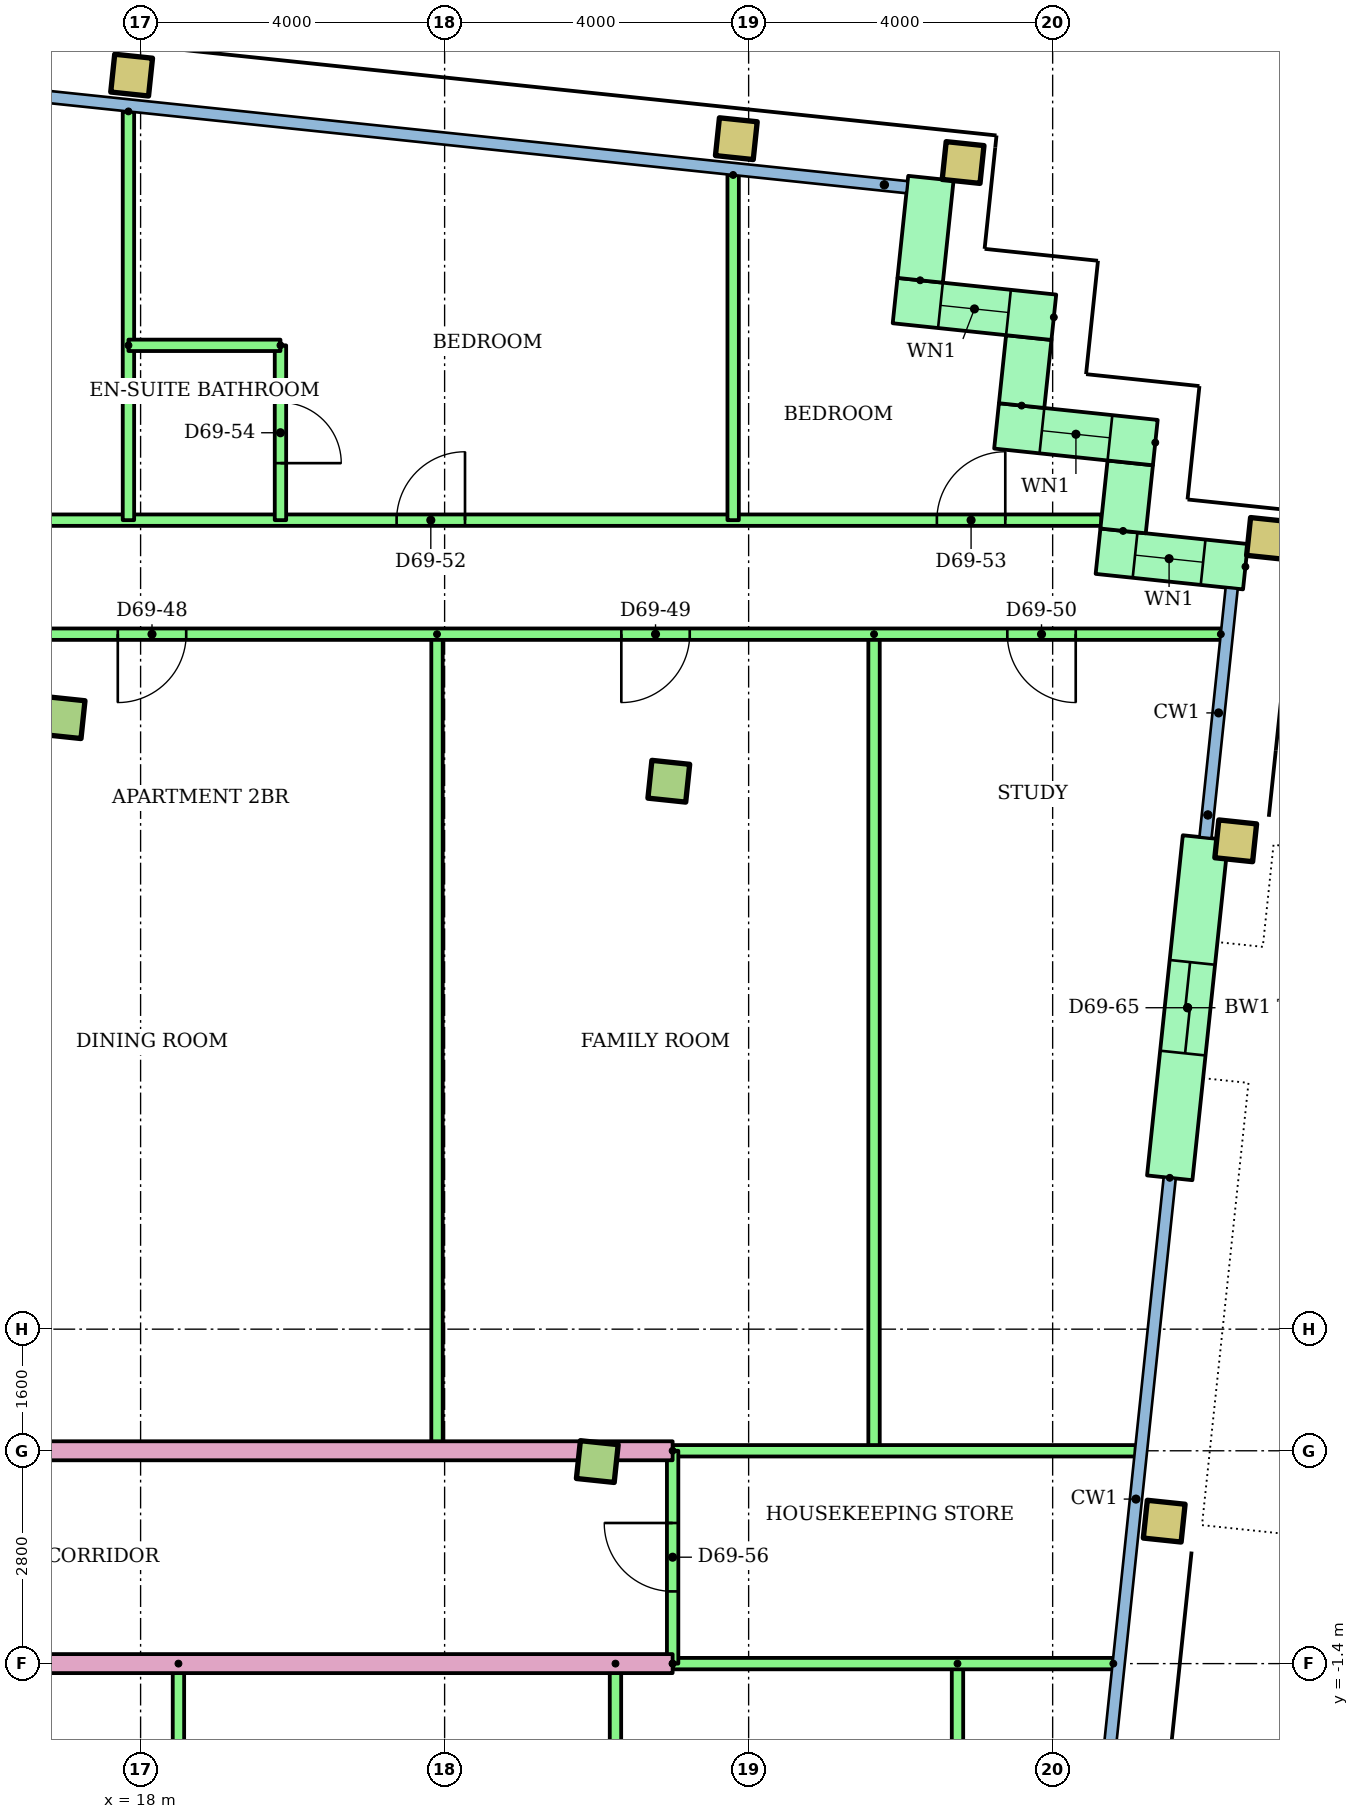
"""IFC4 building model, lengths in metres.
Left out: names, types, materials, properties, quantities, classifications, styles, units other than length and angle.
Written with IfcOpenShell. Run it as: python <this file> out.ifc"""

import sys

from ifc_helpers import new_model, si_unit, direction, frame, frame_2d, origin, origin_2d, place, context, subcontext, project, spatial, rectangle, hollow_rectangle, extrude, element, fill, save


model = new_model("IFC4")
c1 = context("Model", 3, precision=1e-05, world=origin(), true_north=direction((0.0, 1.0)))
c2 = subcontext(c1, "Body", "Model", "MODEL_VIEW")
j1 = project(units=[si_unit("LENGTHUNIT", "METRE"), si_unit("PLANEANGLEUNIT", "RADIAN")], contexts=[c1])
p1 = place(None, origin())
s1 = spatial("IfcSite", under=j1, at=p1, CompositionType="ELEMENT")
p2 = place(p1, origin())
s2 = spatial("IfcBuilding", under=s1, at=p2, CompositionType="ELEMENT")
p3 = place(p2, frame((0.0, 0.0, 265.9)))
s3 = spatial("IfcBuildingStorey", under=s2, at=p3, CompositionType="ELEMENT", Elevation=265.9)
p4 = place(p3, frame((24.009, 1.258, 0.0), z_axis=(0.0, 0.0, 1.0), x_axis=(0.994521895368, -0.104528463268, 0.0)))
e1 = element("IfcColumn", 1, at=p4, inside=s3, PredefinedType="COLUMN", context=c2, shape_type="SweptSolid", body=[
    extrude(rectangle(XDim=0.5, YDim=0.5, at=origin_2d()), origin(), (0.0, 0.0, 1.0), 3.2),
])
p5 = place(p3, frame((31.468, 0.474, 0.0), z_axis=(0.0, 0.0, 1.0), x_axis=(0.994521895368, -0.104528463268, 0.0)))
e2 = element("IfcColumn", 2, at=p5, inside=s3, PredefinedType="COLUMN", context=c2, shape_type="SweptSolid", body=[
    extrude(hollow_rectangle(XDim=0.5, YDim=0.5, WallThickness=0.025, at=origin_2d()), origin(), (0.0, 0.0, 1.0), 3.2),
])
for number, where, z_axis, x_axis in (
    (3, (16.993, 11.045, 0.0), (0.0, 0.0, 1.0), (0.995, -0.105, 0.0)),
    (4, (24.95, 10.209, 0.0), (0.0, 0.0, 1.0), (0.995, -0.105, 0.0)),
):
    element("IfcColumn", number, at=place(p3, frame(where, z_axis=z_axis, x_axis=x_axis)), inside=s3, PredefinedType="COLUMN", context=c2, shape_type="SweptSolid", body=[
        extrude(rectangle(XDim=0.5, YDim=0.5, at=origin_2d()), origin(), (0.0, 0.0, 1.0), 3.2),
    ])
for number, where, z_axis, x_axis in (
    (5, (32.409, 9.425, 0.0), (0.0, 0.0, 1.0), (0.995, -0.105, 0.0)),
    (6, (32.827, 13.403, 0.0), (0.0, 0.0, 1.0), (0.995, -0.105, 0.0)),
    (7, (17.882, 19.498, 0.0), (0.0, 0.0, 1.0), (0.995, -0.105, 0.0)),
    (8, (25.838, 18.662, 0.0), (0.0, 0.0, 1.0), (0.995, -0.105, 0.0)),
    (9, (28.822, 18.349, 0.0), (0.0, 0.0, 1.0), (0.995, -0.105, 0.0)),
):
    element("IfcColumn", number, at=place(p3, frame(where, z_axis=z_axis, x_axis=x_axis)), inside=s3, PredefinedType="COLUMN", context=c2, shape_type="SweptSolid", body=[
        extrude(hollow_rectangle(XDim=0.5, YDim=0.5, WallThickness=0.025, at=origin_2d()), origin(), (0.0, 0.0, 1.0), 3.2),
    ])
p6 = place(p3, frame((32.536, 13.031, 0.0), z_axis=(0.0, 0.0, 1.0), x_axis=(-0.994534226826, 0.104411070641, 0.0)))
e10 = element("IfcWall", 10, at=p6, inside=s3, PredefinedType="STANDARD", context=c2, shape_type="SweptSolid", body=[
    extrude(rectangle(XDim=1.95, YDim=0.6, at=frame_2d((0.975, 0.0))), origin(), (0.0, 0.0, 1.0), 2.92),
])
p7 = place(p6, frame((0.56, 0.0, 0.9)))
e11 = element("IfcOpeningElement", 11, at=p7, cuts=e10, PredefinedType="OPENING", context=c2, shape_type="SweptSolid", body=[
    extrude(rectangle(XDim=0.9, YDim=1.5, at=frame_2d((0.45, 0.75))), frame((0.0, 0.31, 0.0), z_axis=(0.0, -1.0, 0.0), x_axis=(1.0, 0.0, 0.0)), (0.0, 0.0, 1.0), 0.62),
])
p8 = place(p3, frame((30.927, 13.502, 0.0), z_axis=(0.0, 0.0, 1.0), x_axis=(0.104416541099, 0.994533652495, 0.0)))
e12 = element("IfcWall", 12, at=p8, inside=s3, PredefinedType="STANDARD", context=c2, shape_type="SweptSolid", body=[
    extrude(rectangle(XDim=0.9, YDim=0.6, at=frame_2d((0.45, 0.0))), origin(), (0.0, 0.0, 1.0), 2.92),
])
p9 = place(p3, frame((31.351, 14.664, 0.0), z_axis=(0.0, 0.0, 1.0), x_axis=(-0.994523910136, 0.104509292252, 0.0)))
e13 = element("IfcWall", 13, at=p9, inside=s3, PredefinedType="STANDARD", context=c2, shape_type="SweptSolid", body=[
    extrude(rectangle(XDim=2.1, YDim=0.6, at=frame_2d((1.05, 0.0))), origin(), (0.0, 0.0, 1.0), 2.92),
])
p10 = place(p9, frame((0.6, 0.0, 0.9)))
e14 = element("IfcOpeningElement", 14, at=p10, cuts=e13, PredefinedType="OPENING", context=c2, shape_type="SweptSolid", body=[
    extrude(rectangle(XDim=0.9, YDim=1.5, at=frame_2d((0.45, 0.75))), frame((0.0, 0.31, 0.0), z_axis=(0.0, -1.0, 0.0), x_axis=(1.0, 0.0, 0.0)), (0.0, 0.0, 1.0), 0.62),
])
p11 = place(p3, frame((29.592, 15.151, 0.0), z_axis=(0.0, 0.0, 1.0), x_axis=(0.104444712852, 0.994530694326, 0.0)))
e15 = element("IfcWall", 15, at=p11, inside=s3, PredefinedType="STANDARD", context=c2, shape_type="SweptSolid", body=[
    extrude(rectangle(XDim=0.9, YDim=0.6, at=frame_2d((0.45, 0.0))), origin(), (0.0, 0.0, 1.0), 2.92),
])
p12 = place(p3, frame((30.015, 16.312, 0.0), z_axis=(0.0, 0.0, 1.0), x_axis=(-0.994510548187, 0.104636368175, 0.0)))
e16 = element("IfcWall", 16, at=p12, inside=s3, PredefinedType="STANDARD", context=c2, shape_type="SweptSolid", body=[
    extrude(rectangle(XDim=2.1, YDim=0.6, at=frame_2d((1.05, 0.0))), origin(), (0.0, 0.0, 1.0), 2.92),
])
p13 = place(p12, frame((0.6, 0.0, 0.9)))
e17 = element("IfcOpeningElement", 17, at=p13, cuts=e16, PredefinedType="OPENING", context=c2, shape_type="SweptSolid", body=[
    extrude(rectangle(XDim=0.9, YDim=1.5, at=frame_2d((0.45, 0.75))), frame((0.0, 0.31, 0.0), z_axis=(0.0, -1.0, 0.0), x_axis=(1.0, 0.0, 0.0)), (0.0, 0.0, 1.0), 0.62),
])
p14 = place(p3, frame((28.257, 16.799, 0.0), z_axis=(0.0, 0.0, 1.0), x_axis=(0.104534153452, 0.994521297289, 0.0)))
e18 = element("IfcWall", 18, at=p14, inside=s3, PredefinedType="STANDARD", context=c2, shape_type="SweptSolid", body=[
    extrude(rectangle(XDim=1.35, YDim=0.6, at=frame_2d((0.675, 0.0))), origin(), (0.0, 0.0, 1.0), 2.92),
])
p15 = place(p3, frame((31.54, 4.991, 0.0), z_axis=(0.0, 0.0, 1.0), x_axis=(0.104546400045, 0.994520009974, 0.0)))
e19 = element("IfcWall", 19, at=p15, inside=s3, PredefinedType="STANDARD", context=c2, shape_type="SweptSolid", body=[
    extrude(rectangle(XDim=4.5, YDim=0.6, at=frame_2d((2.25, 0.0))), origin(), (0.0, 0.0, 1.0), 2.92),
])
p16 = place(p15, frame((1.65, 0.0, 0.0)))
e20 = element("IfcOpeningElement", 20, at=p16, cuts=e19, PredefinedType="OPENING", context=c2, shape_type="SweptSolid", body=[
    extrude(rectangle(XDim=1.2, YDim=2.1, at=frame_2d((0.6, 1.05))), frame((0.0, 0.31, 0.0), z_axis=(0.0, -1.0, 0.0), x_axis=(1.0, 0.0, 0.0)), (0.0, 0.0, 1.0), 0.62),
])
for number, where, z_axis, x_axis in (
    (21, (18.498, -1.4, 0.0), (0.0, 0.0, 1.0), (0.0, -1.0, 0.0)),
    (22, (24.248, -1.4, 0.0), (0.0, 0.0, 1.0), (0.0, -1.0, 0.0)),
    (23, (28.748, -1.4, 0.0), (0.0, 0.0, 1.0), (0.0, -1.0, 0.0)),
):
    element("IfcWall", number, at=place(p3, frame(where, z_axis=z_axis, x_axis=x_axis)), inside=s3, PredefinedType="PARTITIONING", context=c2, shape_type="SweptSolid", body=[
        extrude(rectangle(XDim=8.982, YDim=0.15, at=frame_2d((4.491, 0.0))), origin(), (0.0, 0.0, 1.0), 2.4),
    ])
p17 = place(p3, frame((25.0, -1.4, 0.0), z_axis=(0.0, 0.0, 1.0), x_axis=(-1.0, 0.0, 0.0)))
e24 = element("IfcWall", 24, at=p17, inside=s3, PredefinedType="PARTITIONING", context=c2, shape_type="SweptSolid", body=[
    extrude(rectangle(XDim=15.0, YDim=0.25, at=frame_2d((7.5, 0.0))), origin(), (0.0, 0.0, 1.0), 2.4),
])
p18 = place(p17, frame((9.658, 0.0, 0.0)))
e25 = element("IfcOpeningElement", 25, at=p18, cuts=e24, PredefinedType="OPENING", context=c2, shape_type="SweptSolid", body=[
    extrude(rectangle(XDim=0.9, YDim=2.1, at=frame_2d((0.45, 1.05))), frame((0.0, 0.135, 0.0), z_axis=(0.0, -1.0, 0.0), x_axis=(1.0, 0.0, 0.0)), (0.0, 0.0, 1.0), 0.27),
])
p19 = place(p3, frame((30.798, -1.4, 0.0), z_axis=(0.0, 0.0, 1.0), x_axis=(-1.0, 0.0, 0.0)))
e26 = element("IfcWall", 26, at=p19, inside=s3, PredefinedType="PARTITIONING", context=c2, shape_type="SweptSolid", body=[
    extrude(rectangle(XDim=5.798, YDim=0.15, at=frame_2d((2.899, 0.0))), origin(), (0.0, 0.0, 1.0), 2.4),
])
for number, where, z_axis, x_axis in (
    (27, (21.9, 12.143, 0.0), (0.0, 0.0, 1.0), (0.0, -1.0, 0.0)),
    (28, (27.65, 12.143, 0.0), (0.0, 0.0, 1.0), (0.0, -1.0, 0.0)),
):
    element("IfcWall", number, at=place(p3, frame(where, z_axis=z_axis, x_axis=x_axis)), inside=s3, PredefinedType="PARTITIONING", context=c2, shape_type="SweptSolid", body=[
        extrude(rectangle(XDim=10.743, YDim=0.15, at=frame_2d((5.372, 0.0))), origin(), (0.0, 0.0, 1.0), 2.4),
    ])
p20 = place(p3, frame((32.213, 12.143, 0.0), z_axis=(0.0, 0.0, 1.0), x_axis=(-1.0, 0.0, 0.0)))
e29 = element("IfcWall", 29, at=p20, inside=s3, PredefinedType="PARTITIONING", context=c2, shape_type="SweptSolid", body=[
    extrude(rectangle(XDim=20.213, YDim=0.15, at=frame_2d((10.106, 0.0))), origin(), (0.0, 0.0, 1.0), 2.4),
])
p21 = place(p20, frame((13.613, 0.0, 0.0)))
e30 = element("IfcOpeningElement", 30, at=p21, cuts=e29, PredefinedType="OPENING", context=c2, shape_type="SweptSolid", body=[
    extrude(rectangle(XDim=0.9, YDim=2.1, at=frame_2d((0.45, 1.05))), frame((0.0, 0.085, 0.0), z_axis=(0.0, -1.0, 0.0), x_axis=(1.0, 0.0, 0.0)), (0.0, 0.0, 1.0), 0.17),
])
p22 = place(p20, frame((6.988, 0.0, 0.0)))
e31 = element("IfcOpeningElement", 31, at=p22, cuts=e29, PredefinedType="OPENING", context=c2, shape_type="SweptSolid", body=[
    extrude(rectangle(XDim=0.9, YDim=2.1, at=frame_2d((0.45, 1.05))), frame((0.0, 0.085, 0.0), z_axis=(0.0, -1.0, 0.0), x_axis=(1.0, 0.0, 0.0)), (0.0, 0.0, 1.0), 0.17),
])
p23 = place(p20, frame((1.909, 0.0, 0.0)))
e32 = element("IfcOpeningElement", 32, at=p23, cuts=e29, PredefinedType="OPENING", context=c2, shape_type="SweptSolid", body=[
    extrude(rectangle(XDim=0.9, YDim=2.1, at=frame_2d((0.45, 1.05))), frame((0.0, 0.085, 0.0), z_axis=(0.0, -1.0, 0.0), x_axis=(1.0, 0.0, 0.0)), (0.0, 0.0, 1.0), 0.17),
])
p24 = place(p3, frame((10.0, 13.643, 0.0)))
e33 = element("IfcWall", 33, at=p24, inside=s3, PredefinedType="PARTITIONING", context=c2, shape_type="SweptSolid", body=[
    extrude(rectangle(XDim=20.641, YDim=0.15, at=frame_2d((10.32, 0.0))), origin(), (0.0, 0.0, 1.0), 2.4),
])
p25 = place(p24, frame((3.42, 0.0, 0.0)))
e34 = element("IfcOpeningElement", 34, at=p25, cuts=e33, PredefinedType="OPENING", context=c2, shape_type="SweptSolid", body=[
    extrude(rectangle(XDim=1.0, YDim=2.1, at=frame_2d((0.5, 1.05))), frame((0.0, 0.085, 0.0), z_axis=(0.0, -1.0, 0.0), x_axis=(1.0, 0.0, 0.0)), (0.0, 0.0, 1.0), 0.17),
])
p26 = place(p24, frame((11.368, 0.0, 0.0)))
e35 = element("IfcOpeningElement", 35, at=p26, cuts=e33, PredefinedType="OPENING", context=c2, shape_type="SweptSolid", body=[
    extrude(rectangle(XDim=0.9, YDim=2.1, at=frame_2d((0.45, 1.05))), frame((0.0, 0.085, 0.0), z_axis=(0.0, -1.0, 0.0), x_axis=(1.0, 0.0, 0.0)), (0.0, 0.0, 1.0), 0.17),
])
p27 = place(p24, frame((18.477, 0.0, 0.0)))
e36 = element("IfcOpeningElement", 36, at=p27, cuts=e33, PredefinedType="OPENING", context=c2, shape_type="SweptSolid", body=[
    extrude(rectangle(XDim=0.9, YDim=2.1, at=frame_2d((0.45, 1.05))), frame((0.0, 0.085, 0.0), z_axis=(0.0, -1.0, 0.0), x_axis=(1.0, 0.0, 0.0)), (0.0, 0.0, 1.0), 0.17),
])
p28 = place(p3, frame((17.84, 19.021, 0.0), z_axis=(0.0, 0.0, 1.0), x_axis=(0.0, -1.0, 0.0)))
e37 = element("IfcWall", 37, at=p28, inside=s3, PredefinedType="PARTITIONING", context=c2, shape_type="SweptSolid", body=[
    extrude(rectangle(XDim=5.378, YDim=0.15, at=frame_2d((2.689, 0.0))), origin(), (0.0, 0.0, 1.0), 2.4),
])
p29 = place(p3, frame((25.796, 18.185, 0.0), z_axis=(0.0, 0.0, 1.0), x_axis=(0.0, -1.0, 0.0)))
e38 = element("IfcWall", 38, at=p29, inside=s3, PredefinedType="PARTITIONING", context=c2, shape_type="SweptSolid", body=[
    extrude(rectangle(XDim=4.542, YDim=0.15, at=frame_2d((2.271, 0.0))), origin(), (0.0, 0.0, 1.0), 2.4),
])
p30 = place(p3, frame((19.84, 15.943, 0.0), z_axis=(0.0, 0.0, 1.0), x_axis=(0.0, -1.0, 0.0)))
e39 = element("IfcWall", 39, at=p30, inside=s3, PredefinedType="PARTITIONING", context=c2, shape_type="SweptSolid", body=[
    extrude(rectangle(XDim=2.3, YDim=0.15, at=frame_2d((1.15, 0.0))), origin(), (0.0, 0.0, 1.0), 2.4),
])
p31 = place(p30, frame((0.75, 0.0, 0.0)))
e40 = element("IfcOpeningElement", 40, at=p31, cuts=e39, PredefinedType="OPENING", context=c2, shape_type="SweptSolid", body=[
    extrude(rectangle(XDim=0.8, YDim=2.1, at=frame_2d((0.4, 1.05))), frame((0.0, 0.085, 0.0), z_axis=(0.0, -1.0, 0.0), x_axis=(1.0, 0.0, 0.0)), (0.0, 0.0, 1.0), 0.17),
])
p32 = place(p3, frame((17.84, 15.943, 0.0)))
e41 = element("IfcWall", 41, at=p32, inside=s3, PredefinedType="PARTITIONING", context=c2, shape_type="SweptSolid", body=[
    extrude(rectangle(XDim=2.0, YDim=0.15, at=frame_2d((1.0, 0.0))), origin(), (0.0, 0.0, 1.0), 2.4),
])
p33 = place(p3, frame((10.0, 1.4, 0.0)))
e42 = element("IfcWall", 42, at=p33, inside=s3, PredefinedType="PARTITIONING", context=c2, shape_type="SweptSolid", body=[
    extrude(rectangle(XDim=15.0, YDim=0.25, at=frame_2d((7.5, 0.0))), origin(), (0.0, 0.0, 1.0), 2.4),
])
p34 = place(p33, frame((0.5, 0.0, 0.0)))
e43 = element("IfcOpeningElement", 43, at=p34, cuts=e42, PredefinedType="OPENING", context=c2, shape_type="SweptSolid", body=[
    extrude(rectangle(XDim=1.0, YDim=2.1, at=frame_2d((0.5, 1.05))), frame((0.0, 0.135, 0.0), z_axis=(0.0, -1.0, 0.0), x_axis=(1.0, 0.0, 0.0)), (0.0, 0.0, 1.0), 0.27),
])
p35 = place(p3, frame((25.0, 1.4, 0.0)))
e44 = element("IfcWall", 44, at=p35, inside=s3, PredefinedType="PARTITIONING", context=c2, shape_type="SweptSolid", body=[
    extrude(rectangle(XDim=6.093, YDim=0.15, at=frame_2d((3.046, 0.0))), origin(), (0.0, 0.0, 1.0), 2.4),
])
p36 = place(p3, frame((25.0, -1.4, 0.0), z_axis=(0.0, 0.0, 1.0), x_axis=(0.0, 1.0, 0.0)))
e45 = element("IfcWall", 45, at=p36, inside=s3, PredefinedType="PARTITIONING", context=c2, shape_type="SweptSolid", body=[
    extrude(rectangle(XDim=2.8, YDim=0.15, at=frame_2d((1.4, 0.0))), origin(), (0.0, 0.0, 1.0), 2.4),
])
p37 = place(p36, frame((0.95, 0.0, 0.0)))
e46 = element("IfcOpeningElement", 46, at=p37, cuts=e45, PredefinedType="OPENING", context=c2, shape_type="SweptSolid", body=[
    extrude(rectangle(XDim=0.9, YDim=2.1, at=frame_2d((0.45, 1.05))), frame((0.0, 0.085, 0.0), z_axis=(0.0, -1.0, 0.0), x_axis=(1.0, 0.0, 0.0)), (0.0, 0.0, 1.0), 0.17),
])
p38 = place(p7, origin())
e47 = element("IfcWindow", 47, at=p38, inside=s3, PartitioningType="SINGLE_PANEL", PredefinedType="WINDOW", context=c2, shape_type="SweptSolid", body=[
    extrude(rectangle(XDim=0.9, YDim=1.5, at=frame_2d((0.45, 0.75))), frame((0.0, 0.03, 0.0), z_axis=(0.0, -1.0, 0.0), x_axis=(1.0, 0.0, 0.0)), (0.0, 0.0, 1.0), 0.06),
])
fill(e11, e47)
p39 = place(p10, origin())
e48 = element("IfcWindow", 48, at=p39, inside=s3, PartitioningType="SINGLE_PANEL", PredefinedType="WINDOW", context=c2, shape_type="SweptSolid", body=[
    extrude(rectangle(XDim=0.9, YDim=1.5, at=frame_2d((0.45, 0.75))), frame((0.0, 0.03, 0.0), z_axis=(0.0, -1.0, 0.0), x_axis=(1.0, 0.0, 0.0)), (0.0, 0.0, 1.0), 0.06),
])
fill(e14, e48)
p40 = place(p13, origin())
e49 = element("IfcWindow", 49, at=p40, inside=s3, PartitioningType="SINGLE_PANEL", PredefinedType="WINDOW", context=c2, shape_type="SweptSolid", body=[
    extrude(rectangle(XDim=0.9, YDim=1.5, at=frame_2d((0.45, 0.75))), frame((0.0, 0.03, 0.0), z_axis=(0.0, -1.0, 0.0), x_axis=(1.0, 0.0, 0.0)), (0.0, 0.0, 1.0), 0.06),
])
fill(e17, e49)
p41 = place(p21, origin())
e50 = element("IfcDoor", 50, at=p41, inside=s3, OperationType="SINGLE_SWING_RIGHT", PredefinedType="DOOR", context=c2, shape_type="SweptSolid", body=[
    extrude(rectangle(XDim=0.9, YDim=2.1, at=frame_2d((0.45, 1.05))), frame((0.0, 0.025, 0.0), z_axis=(0.0, -1.0, 0.0), x_axis=(1.0, 0.0, 0.0)), (0.0, 0.0, 1.0), 0.05),
])
fill(e30, e50)
p42 = place(p22, origin())
e51 = element("IfcDoor", 51, at=p42, inside=s3, OperationType="SINGLE_SWING_RIGHT", PredefinedType="DOOR", context=c2, shape_type="SweptSolid", body=[
    extrude(rectangle(XDim=0.9, YDim=2.1, at=frame_2d((0.45, 1.05))), frame((0.0, 0.025, 0.0), z_axis=(0.0, -1.0, 0.0), x_axis=(1.0, 0.0, 0.0)), (0.0, 0.0, 1.0), 0.05),
])
fill(e31, e51)
p43 = place(p23, origin())
e52 = element("IfcDoor", 52, at=p43, inside=s3, OperationType="SINGLE_SWING_LEFT", PredefinedType="DOOR", context=c2, shape_type="SweptSolid", body=[
    extrude(rectangle(XDim=0.9, YDim=2.1, at=frame_2d((0.45, 1.05))), frame((0.0, 0.025, 0.0), z_axis=(0.0, -1.0, 0.0), x_axis=(1.0, 0.0, 0.0)), (0.0, 0.0, 1.0), 0.05),
])
fill(e32, e52)
p44 = place(p26, origin())
e53 = element("IfcDoor", 53, at=p44, inside=s3, OperationType="SINGLE_SWING_RIGHT", PredefinedType="DOOR", context=c2, shape_type="SweptSolid", body=[
    extrude(rectangle(XDim=0.9, YDim=2.1, at=frame_2d((0.45, 1.05))), frame((0.0, 0.025, 0.0), z_axis=(0.0, -1.0, 0.0), x_axis=(1.0, 0.0, 0.0)), (0.0, 0.0, 1.0), 0.05),
])
fill(e35, e53)
p45 = place(p27, origin())
e54 = element("IfcDoor", 54, at=p45, inside=s3, OperationType="SINGLE_SWING_RIGHT", PredefinedType="DOOR", context=c2, shape_type="SweptSolid", body=[
    extrude(rectangle(XDim=0.9, YDim=2.1, at=frame_2d((0.45, 1.05))), frame((0.0, 0.025, 0.0), z_axis=(0.0, -1.0, 0.0), x_axis=(1.0, 0.0, 0.0)), (0.0, 0.0, 1.0), 0.05),
])
fill(e36, e54)
p46 = place(p31, origin())
e55 = element("IfcDoor", 55, at=p46, inside=s3, OperationType="SINGLE_SWING_RIGHT", PredefinedType="DOOR", context=c2, shape_type="SweptSolid", body=[
    extrude(rectangle(XDim=0.8, YDim=2.1, at=frame_2d((0.4, 1.05))), frame((0.0, 0.025, 0.0), z_axis=(0.0, -1.0, 0.0), x_axis=(1.0, 0.0, 0.0)), (0.0, 0.0, 1.0), 0.05),
])
fill(e40, e55)
p47 = place(p37, origin())
e56 = element("IfcDoor", 56, at=p47, inside=s3, OperationType="SINGLE_SWING_RIGHT", PredefinedType="DOOR", context=c2, shape_type="SweptSolid", body=[
    extrude(rectangle(XDim=0.9, YDim=2.1, at=frame_2d((0.45, 1.05))), frame((0.0, 0.025, 0.0), z_axis=(0.0, -1.0, 0.0), x_axis=(1.0, 0.0, 0.0)), (0.0, 0.0, 1.0), 0.05),
])
fill(e46, e56)
p48 = place(p16, origin())
e57 = element("IfcDoor", 57, at=p48, inside=s3, OperationType="SLIDING_TO_LEFT", PredefinedType="DOOR", context=c2, shape_type="SweptSolid", body=[
    extrude(rectangle(XDim=1.2, YDim=2.1, at=frame_2d((0.6, 1.05))), frame((0.0, 0.025, 0.0), z_axis=(0.0, -1.0, 0.0), x_axis=(1.0, 0.0, 0.0)), (0.0, 0.0, 1.0), 0.05),
])
fill(e20, e57)
save(model, sys.argv[1])
